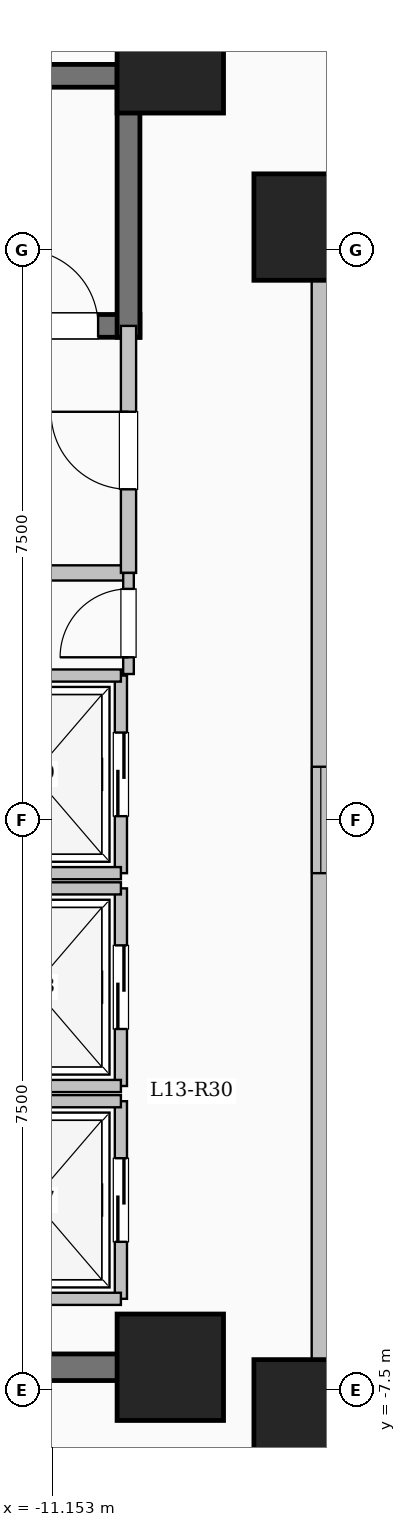
"""IFC4 building model, lengths in metres.
Left out: names, types, materials, properties, quantities, classifications, styles, units other than length and angle.
Written with IfcOpenShell. Run it as: python <this file> out.ifc"""

import sys

from ifc_helpers import new_model, si_unit, direction, frame, frame_2d, origin, origin_2d, place, context, subcontext, project, spatial, rectangle, extrude, element, fill, save


model = new_model("IFC4")
c1 = context("Model", 3, precision=1e-05, world=origin(), true_north=direction((0.0, 1.0)))
c2 = subcontext(c1, "Body", "Model", "MODEL_VIEW")
j1 = project(units=[si_unit("LENGTHUNIT", "METRE"), si_unit("PLANEANGLEUNIT", "RADIAN")], contexts=[c1])
p1 = place(None, origin())
s1 = spatial("IfcSite", under=j1, at=p1, CompositionType="ELEMENT")
p2 = place(p1, origin())
s2 = spatial("IfcBuilding", under=s1, at=p2, CompositionType="ELEMENT")
p3 = place(p2, frame((0.0, 0.0, 50.8)))
s3 = spatial("IfcBuildingStorey", under=s2, at=p3, CompositionType="ELEMENT", Elevation=50.8)
for number, where, z_axis, x_axis in (
    (1, (-7.8, -7.8, 0.0), (0.0, 0.0, 1.0), (1.0, 0.0, 0.0)),
    (2, (-7.8, 7.8, 0.0), (0.0, 0.0, 1.0), (1.0, 0.0, 0.0)),
    (3, (-9.6, -7.2, 0.0), (0.0, 0.0, 1.0), (1.0, 0.0, 0.0)),
    (4, (-9.6, 10.0, 0.0), (0.0, 0.0, 1.0), (1.0, 0.0, 0.0)),
):
    element("IfcColumn", number, at=place(p3, frame(where, z_axis=z_axis, x_axis=x_axis)), inside=s3, PredefinedType="COLUMN", context=c2, shape_type="SweptSolid", body=[
        extrude(rectangle(XDim=1.4, YDim=1.4, at=origin_2d()), origin(), (0.0, 0.0, 1.0), 3.35),
    ])
p4 = place(p3, frame((-7.62, -7.62, 0.0), z_axis=(0.0, 0.0, 1.0), x_axis=(1.0, 0.0, 0.0)))
e5 = element("IfcWall", 5, at=p4, inside=s3, PredefinedType="SOLIDWALL", context=c2, shape_type="SweptSolid", body=[
    extrude(rectangle(XDim=15.24, YDim=0.24, at=frame_2d((7.62, 0.0))), origin(), (0.0, 0.0, 1.0), 3.1),
])
p5 = place(p4, frame((6.92, 0.0, 0.95)))
e6 = element("IfcOpeningElement", 6, at=p5, cuts=e5, PredefinedType="OPENING", context=c2, shape_type="SweptSolid", body=[
    extrude(rectangle(XDim=1.4, YDim=1.5, at=frame_2d((0.7, 0.75))), frame((0.0, 0.13, 0.0), z_axis=(0.0, -1.0, 0.0), x_axis=(1.0, 0.0, 0.0)), (0.0, 0.0, 1.0), 0.26),
])
p6 = place(p3, frame((7.62, 7.62, 0.0), z_axis=(0.0, 0.0, 1.0), x_axis=(-1.0, 0.0, 0.0)))
e7 = element("IfcWall", 7, at=p6, inside=s3, PredefinedType="SOLIDWALL", context=c2, shape_type="SweptSolid", body=[
    extrude(rectangle(XDim=15.24, YDim=0.24, at=frame_2d((7.62, 0.0))), origin(), (0.0, 0.0, 1.0), 3.1),
])
p7 = place(p6, frame((6.92, 0.0, 0.95)))
e8 = element("IfcOpeningElement", 8, at=p7, cuts=e7, PredefinedType="OPENING", context=c2, shape_type="SweptSolid", body=[
    extrude(rectangle(XDim=1.4, YDim=1.5, at=frame_2d((0.7, 0.75))), frame((0.0, 0.13, 0.0), z_axis=(0.0, -1.0, 0.0), x_axis=(1.0, 0.0, 0.0)), (0.0, 0.0, 1.0), 0.26),
])
p8 = place(p3, frame((-7.62, 7.62, 0.0), z_axis=(0.0, 0.0, 1.0), x_axis=(0.0, -1.0, 0.0)))
e9 = element("IfcWall", 9, at=p8, inside=s3, PredefinedType="SOLIDWALL", context=c2, shape_type="SweptSolid", body=[
    extrude(rectangle(XDim=15.24, YDim=0.24, at=frame_2d((7.62, 0.0))), origin(), (0.0, 0.0, 1.0), 3.1),
])
p9 = place(p8, frame((6.92, 0.0, 0.95)))
e10 = element("IfcOpeningElement", 10, at=p9, cuts=e9, PredefinedType="OPENING", context=c2, shape_type="SweptSolid", body=[
    extrude(rectangle(XDim=1.4, YDim=1.5, at=frame_2d((0.7, 0.75))), frame((0.0, 0.13, 0.0), z_axis=(0.0, -1.0, 0.0), x_axis=(1.0, 0.0, 0.0)), (0.0, 0.0, 1.0), 0.26),
])
p10 = place(p3, frame((-18.0, 9.79, 0.0), z_axis=(0.0, 0.0, 1.0), x_axis=(1.0, 0.0, 0.0)))
e11 = element("IfcWall", 11, at=p10, inside=s3, PredefinedType="SHEAR", context=c2, shape_type="SweptSolid", body=[
    extrude(rectangle(XDim=8.0, YDim=0.3, at=frame_2d((4.0, 0.0))), origin(), (0.0, 0.0, 1.0), 3.35),
])
p11 = place(p3, frame((-18.0, 6.5, 0.0), z_axis=(0.0, 0.0, 1.0), x_axis=(1.0, 0.0, 0.0)))
e12 = element("IfcWall", 12, at=p11, inside=s3, PredefinedType="SHEAR", context=c2, shape_type="SweptSolid", body=[
    extrude(rectangle(XDim=8.0, YDim=0.3, at=frame_2d((4.0, 0.0))), origin(), (0.0, 0.0, 1.0), 3.35),
])
p12 = place(p11, frame((6.45, 0.0, 0.0)))
e13 = element("IfcOpeningElement", 13, at=p12, cuts=e12, PredefinedType="OPENING", context=c2, shape_type="SweptSolid", body=[
    extrude(rectangle(XDim=1.0, YDim=2.15, at=frame_2d((0.5, 1.075))), frame((0.0, 0.16, 0.0), z_axis=(0.0, -1.0, 0.0), x_axis=(1.0, 0.0, 0.0)), (0.0, 0.0, 1.0), 0.32),
])
p13 = place(p3, frame((-10.15, 6.35, 0.0), z_axis=(0.0, 0.0, 1.0), x_axis=(0.0, 1.0, 0.0)))
e14 = element("IfcWall", 14, at=p13, inside=s3, PredefinedType="SHEAR", context=c2, shape_type="SweptSolid", body=[
    extrude(rectangle(XDim=3.59, YDim=0.3, at=frame_2d((1.795, 0.0))), origin(), (0.0, 0.0, 1.0), 3.35),
])
p14 = place(p3, frame((-15.55, 3.25, 0.0), z_axis=(0.0, 0.0, 1.0), x_axis=(1.0, 0.0, 0.0)))
e15 = element("IfcWall", 15, at=p14, inside=s3, PredefinedType="SOLIDWALL", context=c2, shape_type="SweptSolid", body=[
    extrude(rectangle(XDim=5.4, YDim=0.2, at=frame_2d((2.7, 0.0))), origin(), (0.0, 0.0, 1.0), 3.1),
])
p15 = place(p3, frame((-10.15, 3.25, 0.0), z_axis=(0.0, 0.0, 1.0), x_axis=(0.0, 1.0, 0.0)))
e16 = element("IfcWall", 16, at=p15, inside=s3, PredefinedType="SOLIDWALL", context=c2, shape_type="SweptSolid", body=[
    extrude(rectangle(XDim=3.25, YDim=0.2, at=frame_2d((1.625, 0.0))), origin(), (0.0, 0.0, 1.0), 3.1),
])
p16 = place(p15, frame((1.1, 0.0, 0.0)))
e17 = element("IfcOpeningElement", 17, at=p16, cuts=e16, PredefinedType="OPENING", context=c2, shape_type="SweptSolid", body=[
    extrude(rectangle(XDim=1.02, YDim=2.15, at=frame_2d((0.51, 1.075))), frame((0.0, 0.11, 0.0), z_axis=(0.0, -1.0, 0.0), x_axis=(1.0, 0.0, 0.0)), (0.0, 0.0, 1.0), 0.22),
])
p17 = place(p3, frame((-10.25, -6.3, 0.0), z_axis=(0.0, 0.0, 1.0), x_axis=(0.0, 1.0, 0.0)))
e18 = element("IfcWall", 18, at=p17, inside=s3, PredefinedType="SOLIDWALL", context=c2, shape_type="SweptSolid", body=[
    extrude(rectangle(XDim=2.6, YDim=0.16, at=frame_2d((1.3, 0.0))), origin(), (0.0, 0.0, 1.0), 3.1),
])
p18 = place(p17, frame((0.75, 0.0, 0.0)))
e19 = element("IfcOpeningElement", 19, at=p18, cuts=e18, PredefinedType="OPENING", context=c2, shape_type="SweptSolid", body=[
    extrude(rectangle(XDim=1.1, YDim=2.15, at=frame_2d((0.55, 1.075))), frame((0.0, 0.09, 0.0), z_axis=(0.0, -1.0, 0.0), x_axis=(1.0, 0.0, 0.0)), (0.0, 0.0, 1.0), 0.18),
])
for number, where, z_axis, x_axis in (
    (20, (-12.55, -6.3, 0.0), (0.0, 0.0, 1.0), (1.0, 0.0, 0.0)),
    (21, (-12.55, -3.7, 0.0), (0.0, 0.0, 1.0), (1.0, 0.0, 0.0)),
):
    element("IfcWall", number, at=place(p3, frame(where, z_axis=z_axis, x_axis=x_axis)), inside=s3, PredefinedType="SOLIDWALL", context=c2, shape_type="SweptSolid", body=[
        extrude(rectangle(XDim=2.3, YDim=0.16, at=frame_2d((1.15, 0.0))), origin(), (0.0, 0.0, 1.0), 3.1),
    ])
p19 = place(p3, frame((-10.25, -3.5, 0.0), z_axis=(0.0, 0.0, 1.0), x_axis=(0.0, 1.0, 0.0)))
e22 = element("IfcWall", 22, at=p19, inside=s3, PredefinedType="SOLIDWALL", context=c2, shape_type="SweptSolid", body=[
    extrude(rectangle(XDim=2.6, YDim=0.16, at=frame_2d((1.3, 0.0))), origin(), (0.0, 0.0, 1.0), 3.1),
])
p20 = place(p19, frame((0.75, 0.0, 0.0)))
e23 = element("IfcOpeningElement", 23, at=p20, cuts=e22, PredefinedType="OPENING", context=c2, shape_type="SweptSolid", body=[
    extrude(rectangle(XDim=1.1, YDim=2.15, at=frame_2d((0.55, 1.075))), frame((0.0, 0.09, 0.0), z_axis=(0.0, -1.0, 0.0), x_axis=(1.0, 0.0, 0.0)), (0.0, 0.0, 1.0), 0.18),
])
for number, where, z_axis, x_axis in (
    (24, (-12.55, -3.5, 0.0), (0.0, 0.0, 1.0), (1.0, 0.0, 0.0)),
    (25, (-12.55, -0.9, 0.0), (0.0, 0.0, 1.0), (1.0, 0.0, 0.0)),
):
    element("IfcWall", number, at=place(p3, frame(where, z_axis=z_axis, x_axis=x_axis)), inside=s3, PredefinedType="SOLIDWALL", context=c2, shape_type="SweptSolid", body=[
        extrude(rectangle(XDim=2.3, YDim=0.16, at=frame_2d((1.15, 0.0))), origin(), (0.0, 0.0, 1.0), 3.1),
    ])
p21 = place(p3, frame((-10.25, -0.7, 0.0), z_axis=(0.0, 0.0, 1.0), x_axis=(0.0, 1.0, 0.0)))
e26 = element("IfcWall", 26, at=p21, inside=s3, PredefinedType="SOLIDWALL", context=c2, shape_type="SweptSolid", body=[
    extrude(rectangle(XDim=2.6, YDim=0.16, at=frame_2d((1.3, 0.0))), origin(), (0.0, 0.0, 1.0), 3.1),
])
p22 = place(p21, frame((0.75, 0.0, 0.0)))
e27 = element("IfcOpeningElement", 27, at=p22, cuts=e26, PredefinedType="OPENING", context=c2, shape_type="SweptSolid", body=[
    extrude(rectangle(XDim=1.1, YDim=2.15, at=frame_2d((0.55, 1.075))), frame((0.0, 0.09, 0.0), z_axis=(0.0, -1.0, 0.0), x_axis=(1.0, 0.0, 0.0)), (0.0, 0.0, 1.0), 0.18),
])
for number, where, z_axis, x_axis in (
    (28, (-12.55, -0.7, 0.0), (0.0, 0.0, 1.0), (1.0, 0.0, 0.0)),
    (29, (-12.55, 1.9, 0.0), (0.0, 0.0, 1.0), (1.0, 0.0, 0.0)),
):
    element("IfcWall", number, at=place(p3, frame(where, z_axis=z_axis, x_axis=x_axis)), inside=s3, PredefinedType="SOLIDWALL", context=c2, shape_type="SweptSolid", body=[
        extrude(rectangle(XDim=2.3, YDim=0.16, at=frame_2d((1.15, 0.0))), origin(), (0.0, 0.0, 1.0), 3.1),
    ])
p23 = place(p3, frame((-18.625, -7.2, 0.0), z_axis=(0.0, 0.0, 1.0), x_axis=(1.0, 0.0, 0.0)))
e30 = element("IfcWall", 30, at=p23, inside=s3, PredefinedType="SHEAR", context=c2, shape_type="SweptSolid", body=[
    extrude(rectangle(XDim=8.55, YDim=0.35, at=frame_2d((4.275, 0.0))), origin(), (0.0, 0.0, 1.0), 3.35),
])
p24 = place(p3, frame((-10.15, 1.92, 0.0), z_axis=(0.0, 0.0, 1.0), x_axis=(0.0, 1.0, 0.0)))
e31 = element("IfcWall", 31, at=p24, inside=s3, PredefinedType="PARTITIONING", context=c2, shape_type="SweptSolid", body=[
    extrude(rectangle(XDim=1.33, YDim=0.14, at=frame_2d((0.665, 0.0))), origin(), (0.0, 0.0, 1.0), 3.1),
])
p25 = place(p24, frame((0.22, 0.0, 0.0)))
e32 = element("IfcOpeningElement", 32, at=p25, cuts=e31, PredefinedType="OPENING", context=c2, shape_type="SweptSolid", body=[
    extrude(rectangle(XDim=0.9, YDim=2.08, at=frame_2d((0.45, 1.04))), frame((0.0, 0.08, 0.0), z_axis=(0.0, -1.0, 0.0), x_axis=(1.0, 0.0, 0.0)), (0.0, 0.0, 1.0), 0.16),
])
p26 = place(p9, origin())
e33 = element("IfcWindow", 33, at=p26, inside=s3, PartitioningType="SINGLE_PANEL", PredefinedType="WINDOW", context=c2, shape_type="SweptSolid", body=[
    extrude(rectangle(XDim=1.4, YDim=1.5, at=frame_2d((0.7, 0.75))), frame((0.0, 0.03, 0.0), z_axis=(0.0, -1.0, 0.0), x_axis=(1.0, 0.0, 0.0)), (0.0, 0.0, 1.0), 0.06),
])
fill(e10, e33)
p27 = place(p12, origin())
e34 = element("IfcDoor", 34, at=p27, inside=s3, OperationType="SINGLE_SWING_LEFT", PredefinedType="DOOR", context=c2, shape_type="SweptSolid", body=[
    extrude(rectangle(XDim=1.0, YDim=2.15, at=frame_2d((0.5, 1.075))), frame((0.0, 0.025, 0.0), z_axis=(0.0, -1.0, 0.0), x_axis=(1.0, 0.0, 0.0)), (0.0, 0.0, 1.0), 0.05),
])
fill(e13, e34)
p28 = place(p16, origin())
e35 = element("IfcDoor", 35, at=p28, inside=s3, OperationType="SINGLE_SWING_RIGHT", PredefinedType="DOOR", context=c2, shape_type="SweptSolid", body=[
    extrude(rectangle(XDim=1.02, YDim=2.15, at=frame_2d((0.51, 1.075))), frame((0.0, 0.025, 0.0), z_axis=(0.0, -1.0, 0.0), x_axis=(1.0, 0.0, 0.0)), (0.0, 0.0, 1.0), 0.05),
])
fill(e17, e35)
p29 = place(p18, origin())
e36 = element("IfcDoor", 36, at=p29, inside=s3, OperationType="SLIDING_TO_LEFT", PredefinedType="DOOR", context=c2, shape_type="SweptSolid", body=[
    extrude(rectangle(XDim=1.1, YDim=2.15, at=frame_2d((0.55, 1.075))), frame((0.0, 0.025, 0.0), z_axis=(0.0, -1.0, 0.0), x_axis=(1.0, 0.0, 0.0)), (0.0, 0.0, 1.0), 0.05),
])
fill(e19, e36)
p30 = place(p20, origin())
e37 = element("IfcDoor", 37, at=p30, inside=s3, OperationType="SLIDING_TO_LEFT", PredefinedType="DOOR", context=c2, shape_type="SweptSolid", body=[
    extrude(rectangle(XDim=1.1, YDim=2.15, at=frame_2d((0.55, 1.075))), frame((0.0, 0.025, 0.0), z_axis=(0.0, -1.0, 0.0), x_axis=(1.0, 0.0, 0.0)), (0.0, 0.0, 1.0), 0.05),
])
fill(e23, e37)
p31 = place(p22, origin())
e38 = element("IfcDoor", 38, at=p31, inside=s3, OperationType="SLIDING_TO_LEFT", PredefinedType="DOOR", context=c2, shape_type="SweptSolid", body=[
    extrude(rectangle(XDim=1.1, YDim=2.15, at=frame_2d((0.55, 1.075))), frame((0.0, 0.025, 0.0), z_axis=(0.0, -1.0, 0.0), x_axis=(1.0, 0.0, 0.0)), (0.0, 0.0, 1.0), 0.05),
])
fill(e27, e38)
p32 = place(p25, origin())
e39 = element("IfcDoor", 39, at=p32, inside=s3, OperationType="SINGLE_SWING_LEFT", PredefinedType="DOOR", context=c2, shape_type="SweptSolid", body=[
    extrude(rectangle(XDim=0.9, YDim=2.08, at=frame_2d((0.45, 1.04))), frame((0.0, 0.025, 0.0), z_axis=(0.0, -1.0, 0.0), x_axis=(1.0, 0.0, 0.0)), (0.0, 0.0, 1.0), 0.05),
])
fill(e32, e39)
save(model, sys.argv[1])
